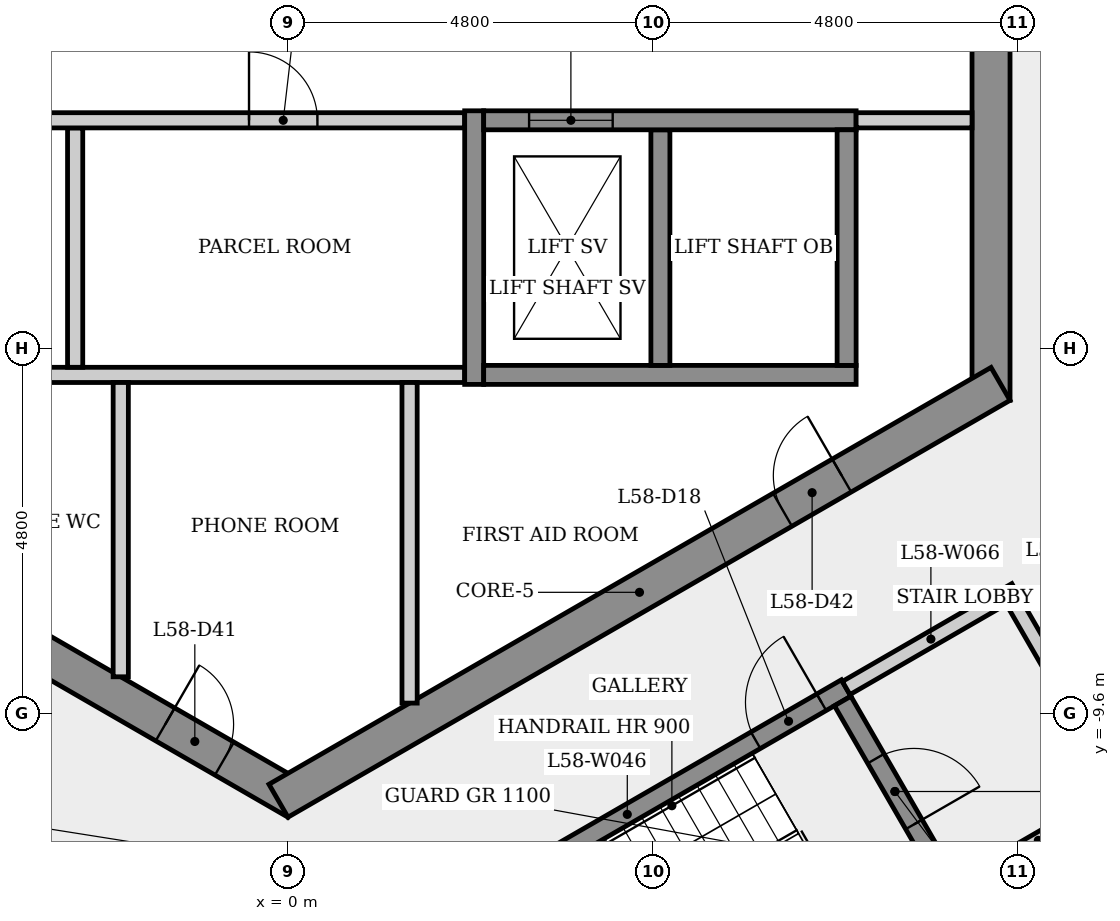
"""IFC4 building model, lengths in metres.
Left out: names, types, materials, properties, quantities, classifications, styles, units other than length and angle.
Written with IfcOpenShell. Run it as: python <this file> out.ifc"""

import sys

from ifc_helpers import new_model, si_unit, direction, frame, frame_2d, origin, place, context, subcontext, project, spatial, rectangle, extrude, element, fill, save


model = new_model("IFC4")
c1 = context("Model", 3, precision=1e-05, world=origin(), true_north=direction((0.0, 1.0)))
c2 = subcontext(c1, "Body", "Model", "MODEL_VIEW")
j1 = project(units=[si_unit("LENGTHUNIT", "METRE"), si_unit("PLANEANGLEUNIT", "RADIAN")], contexts=[c1])
p1 = place(None, origin())
s1 = spatial("IfcSite", under=j1, at=p1, CompositionType="ELEMENT")
p2 = place(p1, origin())
s2 = spatial("IfcBuilding", under=s1, at=p2, CompositionType="ELEMENT")
p3 = place(p2, frame((0.0, 0.0, 218.9)))
s3 = spatial("IfcBuildingStorey", under=s2, at=p3, CompositionType="ELEMENT", Elevation=218.9)
p4 = place(p3, frame((9.25, -5.485, 0.0), z_axis=(0.0, 0.0, 1.0), x_axis=(0.0, 1.0, 0.0)))
e1 = element("IfcWall", 1, at=p4, inside=s3, PredefinedType="SHEAR", context=c2, shape_type="SweptSolid", body=[
    extrude(rectangle(XDim=10.97, YDim=0.5, at=frame_2d((5.485, 0.0))), origin(), (0.0, 0.0, 1.0), 3.4),
])
p5 = place(p4, frame((4.685, 0.0, 0.0)))
e2 = element("IfcOpeningElement", 2, at=p5, cuts=e1, PredefinedType="OPENING", context=c2, shape_type="SweptSolid", body=[
    extrude(rectangle(XDim=1.6, YDim=2.1, at=frame_2d((0.8, 1.05))), frame((0.0, 0.26, 0.0), z_axis=(0.0, -1.0, 0.0), x_axis=(1.0, 0.0, 0.0)), (0.0, 0.0, 1.0), 0.52),
])
p6 = place(p3, frame((-9.375, -5.268, 0.0), z_axis=(0.0, 0.0, 1.0), x_axis=(0.866023993627, -0.500002442456, 0.0)))
e3 = element("IfcWall", 3, at=p6, inside=s3, PredefinedType="SHEAR", context=c2, shape_type="SweptSolid", body=[
    extrude(rectangle(XDim=10.97, YDim=0.5, at=frame_2d((5.485, 0.0))), origin(), (0.0, 0.0, 1.0), 3.4),
])
p7 = place(p6, frame((3.765, 0.0, 0.0)))
e4 = element("IfcOpeningElement", 4, at=p7, cuts=e3, PredefinedType="OPENING", context=c2, shape_type="SweptSolid", body=[
    extrude(rectangle(XDim=0.9, YDim=2.1, at=frame_2d((0.45, 1.05))), frame((0.0, 0.26, 0.0), z_axis=(0.0, -1.0, 0.0), x_axis=(1.0, 0.0, 0.0)), (0.0, 0.0, 1.0), 0.52),
])
p8 = place(p6, frame((8.96, 0.0, 0.0)))
e5 = element("IfcOpeningElement", 5, at=p8, cuts=e3, PredefinedType="OPENING", context=c2, shape_type="SweptSolid", body=[
    extrude(rectangle(XDim=0.9, YDim=2.1, at=frame_2d((0.45, 1.05))), frame((0.0, 0.26, 0.0), z_axis=(0.0, -1.0, 0.0), x_axis=(1.0, 0.0, 0.0)), (0.0, 0.0, 1.0), 0.52),
])
p9 = place(p3, frame((-0.125, -10.753, 0.0), z_axis=(0.0, 0.0, 1.0), x_axis=(0.866023993627, 0.500002442456, 0.0)))
e6 = element("IfcWall", 6, at=p9, inside=s3, PredefinedType="SHEAR", context=c2, shape_type="SweptSolid", body=[
    extrude(rectangle(XDim=10.97, YDim=0.5, at=frame_2d((5.485, 0.0))), origin(), (0.0, 0.0, 1.0), 3.4),
])
p10 = place(p9, frame((7.657, 0.0, 0.0)))
e7 = element("IfcOpeningElement", 7, at=p10, cuts=e6, PredefinedType="OPENING", context=c2, shape_type="SweptSolid", body=[
    extrude(rectangle(XDim=0.9, YDim=2.1, at=frame_2d((0.45, 1.05))), frame((0.0, 0.26, 0.0), z_axis=(0.0, -1.0, 0.0), x_axis=(1.0, 0.0, 0.0)), (0.0, 0.0, 1.0), 0.52),
])
p11 = place(p3, frame((-9.0, -5.15, 0.0), z_axis=(0.0, 0.0, 1.0), x_axis=(1.0, 0.0, 0.0)))
e8 = element("IfcWall", 8, at=p11, inside=s3, PredefinedType="PARTITIONING", context=c2, shape_type="SweptSolid", body=[
    extrude(rectangle(XDim=11.325, YDim=0.2, at=frame_2d((5.663, 0.0))), origin(), (0.0, 0.0, 1.0), 3.05),
])
p12 = place(p3, frame((-6.435, -9.795, 0.0), z_axis=(0.0, 0.0, 1.0), x_axis=(0.866012907634, -0.500021643343, 0.0)))
e9 = element("IfcWall", 9, at=p12, inside=s3, PredefinedType="PARTITIONING", context=c2, shape_type="SweptSolid", body=[
    extrude(rectangle(XDim=4.45, YDim=0.2, at=frame_2d((2.225, 0.0))), origin(), (0.0, 0.0, 1.0), 3.05),
])
p13 = place(p12, frame((1.675, 0.0, 0.0)))
e10 = element("IfcOpeningElement", 10, at=p13, cuts=e9, PredefinedType="OPENING", context=c2, shape_type="SweptSolid", body=[
    extrude(rectangle(XDim=1.1, YDim=2.1, at=frame_2d((0.55, 1.05))), frame((0.0, 0.11, 0.0), z_axis=(0.0, -1.0, 0.0), x_axis=(1.0, 0.0, 0.0)), (0.0, 0.0, 1.0), 0.22),
])
p14 = place(p3, frame((-2.8, -1.9, 0.0), z_axis=(0.0, 0.0, 1.0), x_axis=(0.0, -1.0, 0.0)))
e11 = element("IfcWall", 11, at=p14, inside=s3, PredefinedType="PARTITIONING", context=c2, shape_type="SweptSolid", body=[
    extrude(rectangle(XDim=3.15, YDim=0.2, at=frame_2d((1.575, 0.0))), origin(), (0.0, 0.0, 1.0), 3.05),
])
p15 = place(p3, frame((-9.0, -1.8, 0.0), z_axis=(0.0, 0.0, 1.0), x_axis=(1.0, 0.0, 0.0)))
e12 = element("IfcWall", 12, at=p15, inside=s3, PredefinedType="PARTITIONING", context=c2, shape_type="SweptSolid", body=[
    extrude(rectangle(XDim=11.325, YDim=0.2, at=frame_2d((5.663, 0.0))), origin(), (0.0, 0.0, 1.0), 3.05),
])
p16 = place(p15, frame((2.635, 0.0, 0.0)))
e13 = element("IfcOpeningElement", 13, at=p16, cuts=e12, PredefinedType="OPENING", context=c2, shape_type="SweptSolid", body=[
    extrude(rectangle(XDim=0.9, YDim=2.1, at=frame_2d((0.45, 1.05))), frame((0.0, 0.11, 0.0), z_axis=(0.0, -1.0, 0.0), x_axis=(1.0, 0.0, 0.0)), (0.0, 0.0, 1.0), 0.22),
])
p17 = place(p15, frame((8.488, 0.0, 0.0)))
e14 = element("IfcOpeningElement", 14, at=p17, cuts=e12, PredefinedType="OPENING", context=c2, shape_type="SweptSolid", body=[
    extrude(rectangle(XDim=0.9, YDim=2.1, at=frame_2d((0.45, 1.05))), frame((0.0, 0.11, 0.0), z_axis=(0.0, -1.0, 0.0), x_axis=(1.0, 0.0, 0.0)), (0.0, 0.0, 1.0), 0.22),
])
p18 = place(p3, frame((-2.2, -5.25, 0.0), z_axis=(0.0, 0.0, 1.0), x_axis=(0.0, -1.0, 0.0)))
e15 = element("IfcWall", 15, at=p18, inside=s3, PredefinedType="PARTITIONING", context=c2, shape_type="SweptSolid", body=[
    extrude(rectangle(XDim=3.872, YDim=0.2, at=frame_2d((1.936, 0.0))), origin(), (0.0, 0.0, 1.0), 3.05),
])
p19 = place(p3, frame((1.6, -5.25, 0.0), z_axis=(0.0, 0.0, 1.0), x_axis=(0.0, -1.0, 0.0)))
e16 = element("IfcWall", 16, at=p19, inside=s3, PredefinedType="PARTITIONING", context=c2, shape_type="SweptSolid", body=[
    extrude(rectangle(XDim=4.219, YDim=0.2, at=frame_2d((2.109, 0.0))), origin(), (0.0, 0.0, 1.0), 3.05),
])
p20 = place(p3, frame((1.585, -12.595, 0.0), z_axis=(0.0, 0.0, 1.0), x_axis=(0.866036417653, 0.499980922934, 0.0)))
e17 = element("IfcWall", 17, at=p20, inside=s3, PredefinedType="SHEAR", context=c2, shape_type="SweptSolid", body=[
    extrude(rectangle(XDim=6.65, YDim=0.25, at=frame_2d((3.325, 0.0))), origin(), (0.0, 0.0, 1.0), 3.05),
])
p21 = place(p20, frame((5.275, 0.0, 0.0)))
e18 = element("IfcOpeningElement", 18, at=p21, cuts=e17, PredefinedType="OPENING", context=c2, shape_type="SweptSolid", body=[
    extrude(rectangle(XDim=1.0, YDim=2.1, at=frame_2d((0.5, 1.05))), frame((0.0, 0.135, 0.0), z_axis=(0.0, -1.0, 0.0), x_axis=(1.0, 0.0, 0.0)), (0.0, 0.0, 1.0), 0.27),
])
p22 = place(p3, frame((2.45, -5.275, 0.0), z_axis=(0.0, 0.0, 1.0), x_axis=(0.0, 1.0, 0.0)))
e19 = element("IfcWall", 19, at=p22, inside=s3, PredefinedType="SHEAR", context=c2, shape_type="SweptSolid", body=[
    extrude(rectangle(XDim=3.6, YDim=0.25, at=frame_2d((1.8, 0.0))), origin(), (0.0, 0.0, 1.0), 3.05),
])
p23 = place(p3, frame((2.575, -5.15, 0.0), z_axis=(0.0, 0.0, 1.0), x_axis=(1.0, 0.0, 0.0)))
e20 = element("IfcWall", 20, at=p23, inside=s3, PredefinedType="SHEAR", context=c2, shape_type="SweptSolid", body=[
    extrude(rectangle(XDim=4.9, YDim=0.25, at=frame_2d((2.45, 0.0))), origin(), (0.0, 0.0, 1.0), 3.05),
])
p24 = place(p3, frame((4.9, -1.925, 0.0), z_axis=(0.0, 0.0, 1.0), x_axis=(0.0, -1.0, 0.0)))
e21 = element("IfcWall", 21, at=p24, inside=s3, PredefinedType="SHEAR", context=c2, shape_type="SweptSolid", body=[
    extrude(rectangle(XDim=3.1, YDim=0.25, at=frame_2d((1.55, 0.0))), origin(), (0.0, 0.0, 1.0), 3.4),
])
p25 = place(p3, frame((2.575, -1.8, 0.0), z_axis=(0.0, 0.0, 1.0), x_axis=(1.0, 0.0, 0.0)))
e22 = element("IfcWall", 22, at=p25, inside=s3, PredefinedType="SHEAR", context=c2, shape_type="SweptSolid", body=[
    extrude(rectangle(XDim=4.9, YDim=0.25, at=frame_2d((2.45, 0.0))), origin(), (0.0, 0.0, 1.0), 3.05),
])
p26 = place(p25, frame((0.597, 0.0, 0.0)))
e23 = element("IfcOpeningElement", 23, at=p26, cuts=e22, PredefinedType="OPENING", context=c2, shape_type="SweptSolid", body=[
    extrude(rectangle(XDim=1.1, YDim=2.1, at=frame_2d((0.55, 1.05))), frame((0.0, 0.135, 0.0), z_axis=(0.0, -1.0, 0.0), x_axis=(1.0, 0.0, 0.0)), (0.0, 0.0, 1.0), 0.27),
])
p27 = place(p3, frame((7.298, -9.441, 0.0), z_axis=(0.0, 0.0, 1.0), x_axis=(0.500034990121, -0.866005201286, 0.0)))
e24 = element("IfcWall", 24, at=p27, inside=s3, PredefinedType="SHEAR", context=c2, shape_type="SweptSolid", body=[
    extrude(rectangle(XDim=2.75, YDim=0.25, at=frame_2d((1.375, 0.0))), origin(), (0.0, 0.0, 1.0), 3.05),
])
p28 = place(p27, frame((0.875, 0.0, 0.0)))
e25 = element("IfcOpeningElement", 25, at=p28, cuts=e24, PredefinedType="OPENING", context=c2, shape_type="SweptSolid", body=[
    extrude(rectangle(XDim=1.0, YDim=2.1, at=frame_2d((0.5, 1.05))), frame((0.0, 0.135, 0.0), z_axis=(0.0, -1.0, 0.0), x_axis=(1.0, 0.0, 0.0)), (0.0, 0.0, 1.0), 0.27),
])
p29 = place(p3, frame((7.344, -9.27, 0.0), z_axis=(0.0, 0.0, 1.0), x_axis=(0.866005588531, 0.500034319456, 0.0)))
e26 = element("IfcWall", 26, at=p29, inside=s3, PredefinedType="PARTITIONING", context=c2, shape_type="SweptSolid", body=[
    extrude(rectangle(XDim=2.575, YDim=0.2, at=frame_2d((1.288, 0.0))), origin(), (0.0, 0.0, 1.0), 3.05),
])
p30 = place(p3, frame((7.35, -1.925, 0.0), z_axis=(0.0, 0.0, 1.0), x_axis=(0.0, -1.0, 0.0)))
e27 = element("IfcWall", 27, at=p30, inside=s3, PredefinedType="SHEAR", context=c2, shape_type="SweptSolid", body=[
    extrude(rectangle(XDim=3.1, YDim=0.25, at=frame_2d((1.55, 0.0))), origin(), (0.0, 0.0, 1.0), 3.4),
])
p31 = place(p3, frame((9.0, -1.8, 0.0), z_axis=(0.0, 0.0, 1.0), x_axis=(-1.0, 0.0, 0.0)))
e28 = element("IfcWall", 28, at=p31, inside=s3, PredefinedType="PARTITIONING", context=c2, shape_type="SweptSolid", body=[
    extrude(rectangle(XDim=1.525, YDim=0.2, at=frame_2d((0.763, 0.0))), origin(), (0.0, 0.0, 1.0), 3.05),
])
p32 = place(p3, frame((9.537, -8.119, 0.0), z_axis=(0.0, 0.0, 1.0), x_axis=(0.499990139034, -0.866031096941, 0.0)))
e29 = element("IfcWall", 29, at=p32, inside=s3, PredefinedType="PARTITIONING", context=c2, shape_type="SweptSolid", body=[
    extrude(rectangle(XDim=3.0, YDim=0.2, at=frame_2d((1.5, 0.0))), origin(), (0.0, 0.0, 1.0), 3.05),
])
p33 = place(p32, frame((0.935, 0.0, 0.0)))
e30 = element("IfcOpeningElement", 30, at=p33, cuts=e29, PredefinedType="OPENING", context=c2, shape_type="SweptSolid", body=[
    extrude(rectangle(XDim=1.0, YDim=2.1, at=frame_2d((0.5, 1.05))), frame((0.0, 0.11, 0.0), z_axis=(0.0, -1.0, 0.0), x_axis=(1.0, 0.0, 0.0)), (0.0, 0.0, 1.0), 0.22),
])
p34 = place(p3, frame((10.901, -10.681, 0.0), z_axis=(0.0, 0.0, 1.0), x_axis=(-0.866007538022, -0.500030943131, 0.0)))
e31 = element("IfcWall", 31, at=p34, inside=s3, PredefinedType="PARTITIONING", context=c2, shape_type="SweptSolid", body=[
    extrude(rectangle(XDim=2.375, YDim=0.2, at=frame_2d((1.188, 0.0))), origin(), (0.0, 0.0, 1.0), 3.05),
])
p35 = place(p26, origin())
e32 = element("IfcDoor", 32, at=p35, inside=s3, OperationType="SLIDING_TO_LEFT", PredefinedType="DOOR", context=c2, shape_type="SweptSolid", body=[
    extrude(rectangle(XDim=1.1, YDim=2.1, at=frame_2d((0.55, 1.05))), frame((0.0, 0.025, 0.0), z_axis=(0.0, -1.0, 0.0), x_axis=(1.0, 0.0, 0.0)), (0.0, 0.0, 1.0), 0.05),
])
fill(e23, e32)
p36 = place(p17, origin())
e33 = element("IfcDoor", 33, at=p36, inside=s3, OperationType="SINGLE_SWING_LEFT", PredefinedType="DOOR", context=c2, shape_type="SweptSolid", body=[
    extrude(rectangle(XDim=0.9, YDim=2.1, at=frame_2d((0.45, 1.05))), frame((0.0, 0.025, 0.0), z_axis=(0.0, -1.0, 0.0), x_axis=(1.0, 0.0, 0.0)), (0.0, 0.0, 1.0), 0.05),
])
fill(e14, e33)
p37 = place(p21, origin())
e34 = element("IfcDoor", 34, at=p37, inside=s3, OperationType="SINGLE_SWING_RIGHT", PredefinedType="DOOR", context=c2, shape_type="SweptSolid", body=[
    extrude(rectangle(XDim=1.0, YDim=2.1, at=frame_2d((0.5, 1.05))), frame((0.0, 0.025, 0.0), z_axis=(0.0, -1.0, 0.0), x_axis=(1.0, 0.0, 0.0)), (0.0, 0.0, 1.0), 0.05),
])
fill(e18, e34)
p38 = place(p28, origin())
e35 = element("IfcDoor", 35, at=p38, inside=s3, OperationType="SINGLE_SWING_RIGHT", PredefinedType="DOOR", context=c2, shape_type="SweptSolid", body=[
    extrude(rectangle(XDim=1.0, YDim=2.1, at=frame_2d((0.5, 1.05))), frame((0.0, 0.025, 0.0), z_axis=(0.0, -1.0, 0.0), x_axis=(1.0, 0.0, 0.0)), (0.0, 0.0, 1.0), 0.05),
])
fill(e25, e35)
p39 = place(p8, origin())
e36 = element("IfcDoor", 36, at=p39, inside=s3, OperationType="SINGLE_SWING_LEFT", PredefinedType="DOOR", context=c2, shape_type="SweptSolid", body=[
    extrude(rectangle(XDim=0.9, YDim=2.1, at=frame_2d((0.45, 1.05))), frame((0.0, 0.025, 0.0), z_axis=(0.0, -1.0, 0.0), x_axis=(1.0, 0.0, 0.0)), (0.0, 0.0, 1.0), 0.05),
])
fill(e5, e36)
p40 = place(p10, origin())
e37 = element("IfcDoor", 37, at=p40, inside=s3, OperationType="SINGLE_SWING_RIGHT", PredefinedType="DOOR", context=c2, shape_type="SweptSolid", body=[
    extrude(rectangle(XDim=0.9, YDim=2.1, at=frame_2d((0.45, 1.05))), frame((0.0, 0.025, 0.0), z_axis=(0.0, -1.0, 0.0), x_axis=(1.0, 0.0, 0.0)), (0.0, 0.0, 1.0), 0.05),
])
fill(e7, e37)
save(model, sys.argv[1])
